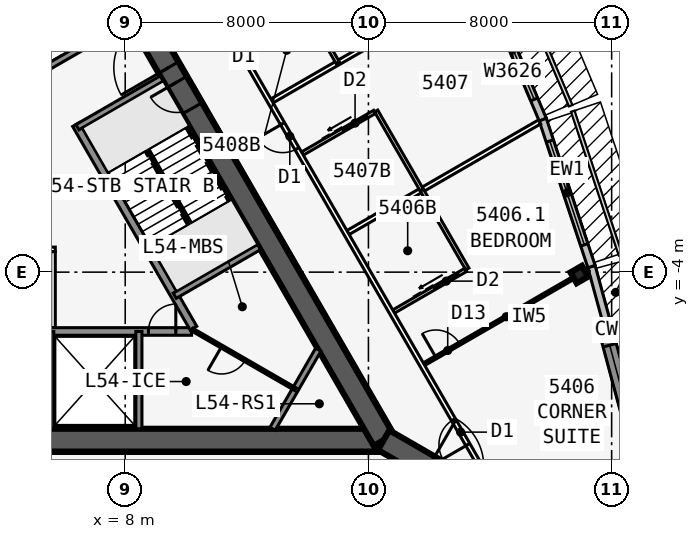
"""IFC4 building model, lengths in metres.
Left out: names, types, materials, properties, quantities, classifications, styles, units other than length and angle.
Written with IfcOpenShell. Run it as: python <this file> out.ifc"""

import sys

from ifc_helpers import new_model, si_unit, direction, frame, frame_2d, origin, origin_2d, place, context, subcontext, project, spatial, polyline, rectangle, i_section, outline, extrude, element, fill, save


model = new_model("IFC4")
c1 = context("Model", 3, precision=1e-05, world=origin(), true_north=direction((0.0, 1.0)))
c2 = subcontext(c1, "Body", "Model", "MODEL_VIEW")
j1 = project(units=[si_unit("LENGTHUNIT", "METRE"), si_unit("PLANEANGLEUNIT", "RADIAN")], contexts=[c1])
p1 = place(None, origin())
s1 = spatial("IfcSite", under=j1, at=p1, CompositionType="ELEMENT")
p2 = place(p1, origin())
s2 = spatial("IfcBuilding", under=s1, at=p2, CompositionType="ELEMENT")
p3 = place(p2, frame((0.0, 0.0, 204.5)))
s3 = spatial("IfcBuildingStorey", under=s2, at=p3, CompositionType="ELEMENT", Elevation=204.5)
p4 = place(p3, frame((-16.5, -9.526, 0.0), z_axis=(0.0, 0.0, 1.0), x_axis=(1.0, 0.0, 0.0)))
e1 = element("IfcWall", 1, at=p4, inside=s3, PredefinedType="SHEAR", context=c2, shape_type="SweptSolid", body=[
    extrude(rectangle(XDim=33.0, YDim=0.75, at=frame_2d((16.5, 0.0))), origin(), (0.0, 0.0, 1.0), 3.6),
])
p5 = place(p4, frame((14.05, 0.0, 0.0)))
e2 = element("IfcOpeningElement", 2, at=p5, cuts=e1, PredefinedType="OPENING", context=c2, shape_type="SweptSolid", body=[
    extrude(rectangle(XDim=1.8, YDim=2.13, at=frame_2d((0.9, 1.065))), frame((0.0, 0.385, 0.0), z_axis=(0.0, -1.0, 0.0), x_axis=(1.0, 0.0, 0.0)), (0.0, 0.0, 1.0), 0.77),
])
p6 = place(p3, frame((-0.55, -5.951, 0.0), z_axis=(0.0, 0.0, 1.0), x_axis=(1.0, 0.0, 0.0)))
e3 = element("IfcWall", 3, at=p6, inside=s3, PredefinedType="SOLIDWALL", context=c2, shape_type="SweptSolid", body=[
    extrude(rectangle(XDim=10.733, YDim=0.25, at=frame_2d((5.366, 0.0))), origin(), (0.0, 0.0, 1.0), 3.435),
])
p7 = place(p6, frame((9.314, 0.0, 0.0)))
e4 = element("IfcOpeningElement", 4, at=p7, cuts=e3, PredefinedType="OPENING", context=c2, shape_type="SweptSolid", body=[
    extrude(rectangle(XDim=0.9, YDim=2.13, at=frame_2d((0.45, 1.065))), frame((0.0, 0.135, 0.0), z_axis=(0.0, -1.0, 0.0), x_axis=(1.0, 0.0, 0.0)), (0.0, 0.0, 1.0), 0.27),
])
p8 = place(p6, frame((1.05, 0.0, 0.0)))
e5 = element("IfcOpeningElement", 5, at=p8, cuts=e3, PredefinedType="OPENING", context=c2, shape_type="SweptSolid", body=[
    extrude(rectangle(XDim=1.1, YDim=2.13, at=frame_2d((0.55, 1.065))), frame((0.0, 0.135, 0.0), z_axis=(0.0, -1.0, 0.0), x_axis=(1.0, 0.0, 0.0)), (0.0, 0.0, 1.0), 0.27),
])
p9 = place(p6, frame((4.05, 0.0, 0.0)))
e6 = element("IfcOpeningElement", 6, at=p9, cuts=e3, PredefinedType="OPENING", context=c2, shape_type="SweptSolid", body=[
    extrude(rectangle(XDim=1.1, YDim=2.13, at=frame_2d((0.55, 1.065))), frame((0.0, 0.135, 0.0), z_axis=(0.0, -1.0, 0.0), x_axis=(1.0, 0.0, 0.0)), (0.0, 0.0, 1.0), 0.27),
])
for number, where, z_axis, x_axis in (
    (7, (5.55, -5.951, 0.0), (0.0, 0.0, 1.0), (0.0, -1.0, 0.0)),
    (8, (8.45, -5.951, 0.0), (0.0, 0.0, 1.0), (0.0, -1.0, 0.0)),
):
    element("IfcWall", number, at=place(p3, frame(where, z_axis=z_axis, x_axis=x_axis)), inside=s3, PredefinedType="SOLIDWALL", context=c2, shape_type="SweptSolid", body=[
        extrude(rectangle(XDim=3.2, YDim=0.2, at=frame_2d((1.6, 0.0))), origin(), (0.0, 0.0, 1.0), 3.435),
    ])
p10 = place(p3, frame((16.5, -9.526, 0.0), z_axis=(0.0, 0.0, 1.0), x_axis=(-0.499999749417, 0.866025548458, 0.0)))
e9 = element("IfcWall", 9, at=p10, inside=s3, PredefinedType="SHEAR", context=c2, shape_type="SweptSolid", body=[
    extrude(rectangle(XDim=33.0, YDim=0.75, at=frame_2d((16.5, 0.0))), origin(), (0.0, 0.0, 1.0), 3.6),
])
p11 = place(p10, frame((14.15, 0.0, 0.0)))
e10 = element("IfcOpeningElement", 10, at=p11, cuts=e9, PredefinedType="OPENING", context=c2, shape_type="SweptSolid", body=[
    extrude(rectangle(XDim=1.8, YDim=2.13, at=frame_2d((0.9, 1.065))), frame((0.0, 0.385, 0.0), z_axis=(0.0, -1.0, 0.0), x_axis=(1.0, 0.0, 0.0)), (0.0, 0.0, 1.0), 0.77),
])
p12 = place(p10, frame((12.6, 0.0, 0.0)))
e11 = element("IfcOpeningElement", 11, at=p12, cuts=e9, PredefinedType="OPENING", context=c2, shape_type="SweptSolid", body=[
    extrude(rectangle(XDim=1.0, YDim=2.13, at=frame_2d((0.5, 1.065))), frame((0.0, 0.385, 0.0), z_axis=(0.0, -1.0, 0.0), x_axis=(1.0, 0.0, 0.0)), (0.0, 0.0, 1.0), 0.77),
])
p13 = place(p3, frame((10.245, -5.843, 0.0), z_axis=(0.0, 0.0, 1.0), x_axis=(-0.499993009313, 0.866029439822, 0.0)))
e12 = element("IfcWall", 12, at=p13, inside=s3, PredefinedType="SOLIDWALL", context=c2, shape_type="SweptSolid", body=[
    extrude(rectangle(XDim=7.733, YDim=0.25, at=frame_2d((3.866, 0.0))), origin(), (0.0, 0.0, 1.0), 3.435),
])
for number, where, z_axis, x_axis in (
    (13, (9.629, -4.775, 0.0), (0.0, 0.0, 1.0), (0.866, 0.5, 0.0)),
    (14, (6.429, 0.767, 0.0), (0.0, 0.0, 1.0), (0.866, 0.5, 0.0)),
):
    element("IfcWall", number, at=place(p3, frame(where, z_axis=z_axis, x_axis=x_axis)), inside=s3, PredefinedType="SOLIDWALL", context=c2, shape_type="SweptSolid", body=[
        extrude(rectangle(XDim=3.2, YDim=0.2, at=frame_2d((1.6, 0.0))), origin(), (0.0, 0.0, 1.0), 3.435),
    ])
p14 = place(p3, frame((5.329, 2.673, 0.0), z_axis=(0.0, 0.0, 1.0), x_axis=(0.866022944154, 0.50000426018, 0.0)))
e15 = element("IfcWall", 15, at=p14, inside=s3, PredefinedType="SOLIDWALL", context=c2, shape_type="SweptSolid", body=[
    extrude(rectangle(XDim=3.2, YDim=0.2, at=frame_2d((1.6, 0.0))), origin(), (0.0, 0.0, 1.0), 3.435),
])
p15 = place(p3, frame((16.5, -9.526, 0.0), z_axis=(0.0, 0.0, 1.0), x_axis=(0.866031398331, -0.499989616998, 0.0)))
e16 = element("IfcWall", 16, at=p15, inside=s3, PredefinedType="SHEAR", context=c2, shape_type="SweptSolid", body=[
    extrude(rectangle(XDim=4.746, YDim=0.75, at=frame_2d((2.373, 0.0))), origin(), (0.0, 0.0, 1.0), 3.6),
])
p16 = place(p15, frame((1.725, 0.0, 0.0)))
e17 = element("IfcOpeningElement", 17, at=p16, cuts=e16, PredefinedType="OPENING", context=c2, shape_type="SweptSolid", body=[
    extrude(rectangle(XDim=1.8, YDim=2.13, at=frame_2d((0.9, 1.065))), frame((0.0, 0.385, 0.0), z_axis=(0.0, -1.0, 0.0), x_axis=(1.0, 0.0, 0.0)), (0.0, 0.0, 1.0), 0.77),
])
p17 = place(p3, frame((22.937, -4.078, 0.0), z_axis=(0.0, 0.0, 1.0), x_axis=(-0.5, 0.866025403784, 0.0)))
e18 = element("IfcColumn", 18, at=p17, inside=s3, PredefinedType="COLUMN", context=c2, shape_type="SweptSolid", body=[
    extrude(i_section(OverallWidth=0.411, OverallDepth=0.434, WebThickness=0.036, FlangeThickness=0.057, at=origin_2d()), origin(), (0.0, 0.0, 1.0), 3.6),
])
p18 = place(p3, frame((23.783, -13.798, 0.0), z_axis=(0.0, 0.0, 1.0), x_axis=(0.258799282522, 0.96593112144, 0.0)))
e19 = element("IfcWall", 19, at=p18, inside=s3, PredefinedType="SOLIDWALL", context=c2, shape_type="SweptSolid", body=[
    extrude(outline(polyline([(4.184, 0.225), (0.509, 0.225), (0.479, 0.113), (0.059, 0.225), (0.0, 0.225), (0.0, -0.225), (4.184, -0.225), (4.184, 0.225)])), origin(), (0.0, 0.0, 1.0), 3.435),
])
p19 = place(p18, frame((1.071, 0.0, 0.45)))
e20 = element("IfcOpeningElement", 20, at=p19, cuts=e19, PredefinedType="OPENING", context=c2, shape_type="SweptSolid", body=[
    extrude(rectangle(XDim=2.4, YDim=2.6, at=frame_2d((1.2, 1.3))), frame((0.0, 0.235, 0.0), z_axis=(0.0, -1.0, 0.0), x_axis=(1.0, 0.0, 0.0)), (0.0, 0.0, 1.0), 0.47),
])
p20 = place(p3, frame((24.865, -9.873, 0.0), z_axis=(0.0, 0.0, 1.0), x_axis=(-0.258784695888, 0.965935029479, 0.0)))
e21 = element("IfcWall", 21, at=p20, inside=s3, PredefinedType="SOLIDWALL", context=c2, shape_type="SweptSolid", body=[
    extrude(rectangle(XDim=4.184, YDim=0.45, at=frame_2d((2.092, 0.0))), origin(), (0.0, 0.0, 1.0), 3.435),
])
p21 = place(p20, frame((0.592, 0.0, 0.45)))
e22 = element("IfcOpeningElement", 22, at=p21, cuts=e21, PredefinedType="OPENING", context=c2, shape_type="SweptSolid", body=[
    extrude(rectangle(XDim=3.0, YDim=2.6, at=frame_2d((1.5, 1.3))), frame((0.0, 0.235, 0.0), z_axis=(0.0, -1.0, 0.0), x_axis=(1.0, 0.0, 0.0)), (0.0, 0.0, 1.0), 0.47),
])
p22 = place(p3, frame((23.879, -5.806, 0.0), z_axis=(0.0, 0.0, 1.0), x_axis=(-0.262867703986, 0.964831887015, 0.0)))
e23 = element("IfcWall", 23, at=p22, inside=s3, PredefinedType="STANDARD", context=c2, shape_type="SweptSolid", body=[
    extrude(rectangle(XDim=2.068, YDim=0.25, at=frame_2d((1.034, 0.0))), origin(), (0.0, 0.0, 1.0), 3.435),
])
p23 = place(p3, frame((23.338, -3.817, 0.0), z_axis=(0.0, 0.0, 1.0), x_axis=(-0.315108478109, 0.949055660656, 0.0)))
e24 = element("IfcWall", 24, at=p23, inside=s3, PredefinedType="STANDARD", context=c2, shape_type="SweptSolid", body=[
    extrude(rectangle(XDim=5.105, YDim=0.25, at=frame_2d((2.552, 0.0))), origin(), (0.0, 0.0, 1.0), 3.435),
])
p24 = place(p23, frame((0.752, 0.0, 0.45)))
e25 = element("IfcOpeningElement", 25, at=p24, cuts=e24, PredefinedType="OPENING", context=c2, shape_type="SweptSolid", body=[
    extrude(rectangle(XDim=3.6, YDim=2.6, at=frame_2d((1.8, 1.3))), frame((0.0, 0.135, 0.0), z_axis=(0.0, -1.0, 0.0), x_axis=(1.0, 0.0, 0.0)), (0.0, 0.0, 1.0), 0.27),
])
p25 = place(p3, frame((21.733, 1.018, 0.0), z_axis=(0.0, 0.0, 1.0), x_axis=(-0.390096809471, 0.920773848044, 0.0)))
e26 = element("IfcWall", 26, at=p25, inside=s3, PredefinedType="STANDARD", context=c2, shape_type="SweptSolid", body=[
    extrude(rectangle(XDim=5.038, YDim=0.25, at=frame_2d((2.519, 0.0))), origin(), (0.0, 0.0, 1.0), 3.435),
])
p26 = place(p25, frame((0.719, 0.0, 0.45)))
e27 = element("IfcOpeningElement", 27, at=p26, cuts=e26, PredefinedType="OPENING", context=c2, shape_type="SweptSolid", body=[
    extrude(rectangle(XDim=3.6, YDim=2.6, at=frame_2d((1.8, 1.3))), frame((0.0, 0.135, 0.0), z_axis=(0.0, -1.0, 0.0), x_axis=(1.0, 0.0, 0.0)), (0.0, 0.0, 1.0), 0.27),
])
p27 = place(p3, frame((20.102, -11.115, 0.0), z_axis=(0.0, 0.0, 1.0), x_axis=(-0.500000265775, 0.866025250339, 0.0)))
e28 = element("IfcWall", 28, at=p27, inside=s3, PredefinedType="PARTITIONING", context=c2, shape_type="SweptSolid", body=[
    extrude(rectangle(XDim=39.354, YDim=0.15, at=frame_2d((19.677, 0.0))), origin(), (0.0, 0.0, 1.0), 3.435),
])
p28 = place(p27, frame((1.665, 0.0, 0.0)))
e29 = element("IfcOpeningElement", 29, at=p28, cuts=e28, PredefinedType="OPENING", context=c2, shape_type="SweptSolid", body=[
    extrude(rectangle(XDim=0.95, YDim=2.13, at=frame_2d((0.475, 1.065))), frame((0.0, 0.085, 0.0), z_axis=(0.0, -1.0, 0.0), x_axis=(1.0, 0.0, 0.0)), (0.0, 0.0, 1.0), 0.17),
])
p29 = place(p27, frame((12.902, 0.0, 0.0)))
e30 = element("IfcOpeningElement", 30, at=p29, cuts=e28, PredefinedType="OPENING", context=c2, shape_type="SweptSolid", body=[
    extrude(rectangle(XDim=0.95, YDim=2.13, at=frame_2d((0.475, 1.065))), frame((0.0, 0.085, 0.0), z_axis=(0.0, -1.0, 0.0), x_axis=(1.0, 0.0, 0.0)), (0.0, 0.0, 1.0), 0.17),
])
p30 = place(p27, frame((17.302, 0.0, 0.0)))
e31 = element("IfcOpeningElement", 31, at=p30, cuts=e28, PredefinedType="OPENING", context=c2, shape_type="SweptSolid", body=[
    extrude(rectangle(XDim=0.95, YDim=2.13, at=frame_2d((0.475, 1.065))), frame((0.0, 0.085, 0.0), z_axis=(0.0, -1.0, 0.0), x_axis=(1.0, 0.0, 0.0)), (0.0, 0.0, 1.0), 0.17),
])
p31 = place(p27, frame((22.902, 0.0, 0.0)))
e32 = element("IfcOpeningElement", 32, at=p31, cuts=e28, PredefinedType="OPENING", context=c2, shape_type="SweptSolid", body=[
    extrude(rectangle(XDim=0.95, YDim=2.13, at=frame_2d((0.475, 1.065))), frame((0.0, 0.085, 0.0), z_axis=(0.0, -1.0, 0.0), x_axis=(1.0, 0.0, 0.0)), (0.0, 0.0, 1.0), 0.17),
])
p32 = place(p27, frame((32.302, 0.0, 0.0)))
e33 = element("IfcOpeningElement", 33, at=p32, cuts=e28, PredefinedType="OPENING", context=c2, shape_type="SweptSolid", body=[
    extrude(rectangle(XDim=0.95, YDim=2.13, at=frame_2d((0.475, 1.065))), frame((0.0, 0.085, 0.0), z_axis=(0.0, -1.0, 0.0), x_axis=(1.0, 0.0, 0.0)), (0.0, 0.0, 1.0), 0.17),
])
p33 = place(p27, frame((37.302, 0.0, 0.0)))
e34 = element("IfcOpeningElement", 34, at=p33, cuts=e28, PredefinedType="OPENING", context=c2, shape_type="SweptSolid", body=[
    extrude(rectangle(XDim=0.95, YDim=2.13, at=frame_2d((0.475, 1.065))), frame((0.0, 0.085, 0.0), z_axis=(0.0, -1.0, 0.0), x_axis=(1.0, 0.0, 0.0)), (0.0, 0.0, 1.0), 0.17),
])
p34 = place(p3, frame((17.829, -7.027, 0.0), z_axis=(0.0, 0.0, 1.0), x_axis=(0.866026604282, 0.499997920671, 0.0)))
e35 = element("IfcWall", 35, at=p34, inside=s3, PredefinedType="PARTITIONING", context=c2, shape_type="SweptSolid", body=[
    extrude(rectangle(XDim=6.24, YDim=0.1, at=frame_2d((3.12, 0.0))), origin(), (0.0, 0.0, 1.0), 2.589),
])
p35 = place(p34, frame((0.45, 0.0, 0.0)))
e36 = element("IfcOpeningElement", 36, at=p35, cuts=e35, PredefinedType="OPENING", context=c2, shape_type="SweptSolid", body=[
    extrude(rectangle(XDim=0.9, YDim=2.13, at=frame_2d((0.45, 1.065))), frame((0.0, 0.06, 0.0), z_axis=(0.0, -1.0, 0.0), x_axis=(1.0, 0.0, 0.0)), (0.0, 0.0, 1.0), 0.12),
])
p36 = place(p3, frame((15.329, -2.697, 0.0), z_axis=(0.0, 0.0, 1.0), x_axis=(0.866032413668, 0.499987858329, 0.0)))
e37 = element("IfcWall", 37, at=p36, inside=s3, PredefinedType="PARTITIONING", context=c2, shape_type="SweptSolid", body=[
    extrude(rectangle(XDim=7.273, YDim=0.15, at=frame_2d((3.636, 0.0))), origin(), (0.0, 0.0, 1.0), 2.589),
])
p37 = place(p3, frame((12.829, 1.633, 0.0), z_axis=(0.0, 0.0, 1.0), x_axis=(0.866030558329, 0.49999107196, 0.0)))
e38 = element("IfcWall", 38, at=p37, inside=s3, PredefinedType="PARTITIONING", context=c2, shape_type="SweptSolid", body=[
    extrude(rectangle(XDim=7.894, YDim=0.15, at=frame_2d((3.947, 0.0))), origin(), (0.0, 0.0, 1.0), 2.589),
])
p38 = place(p3, frame((19.253, -3.895, 0.0), z_axis=(0.0, 0.0, 1.0), x_axis=(-0.499990139034, 0.866031096941, 0.0)))
e39 = element("IfcWall", 39, at=p38, inside=s3, PredefinedType="PLUMBINGWALL", context=c2, shape_type="SweptSolid", body=[
    extrude(rectangle(XDim=3.0, YDim=0.12, at=frame_2d((1.5, 0.0))), origin(), (0.0, 0.0, 1.0), 3.435),
])
p39 = place(p3, frame((16.829, -5.295, 0.0), z_axis=(0.0, 0.0, 1.0), x_axis=(0.866035715982, 0.499982138324, 0.0)))
e40 = element("IfcWall", 40, at=p39, inside=s3, PredefinedType="PLUMBINGWALL", context=c2, shape_type="SweptSolid", body=[
    extrude(rectangle(XDim=2.74, YDim=0.12, at=frame_2d((1.37, 0.0))), origin(), (0.0, 0.0, 1.0), 3.435),
])
p40 = place(p39, frame((1.55, 0.0, 0.0)))
e41 = element("IfcOpeningElement", 41, at=p40, cuts=e40, PredefinedType="OPENING", context=c2, shape_type="SweptSolid", body=[
    extrude(rectangle(XDim=0.9, YDim=2.13, at=frame_2d((0.45, 1.065))), frame((0.0, 0.07, 0.0), z_axis=(0.0, -1.0, 0.0), x_axis=(1.0, 0.0, 0.0)), (0.0, 0.0, 1.0), 0.14),
])
p41 = place(p3, frame((17.753, -1.297, 0.0), z_axis=(0.0, 0.0, 1.0), x_axis=(-0.499990139034, 0.866031096941, 0.0)))
e42 = element("IfcWall", 42, at=p41, inside=s3, PredefinedType="PLUMBINGWALL", context=c2, shape_type="SweptSolid", body=[
    extrude(rectangle(XDim=3.0, YDim=0.12, at=frame_2d((1.5, 0.0))), origin(), (0.0, 0.0, 1.0), 3.435),
])
p42 = place(p3, frame((13.829, -0.099, 0.0), z_axis=(0.0, 0.0, 1.0), x_axis=(0.865997131366, 0.500048966069, 0.0)))
e43 = element("IfcWall", 43, at=p42, inside=s3, PredefinedType="PLUMBINGWALL", context=c2, shape_type="SweptSolid", body=[
    extrude(rectangle(XDim=2.74, YDim=0.12, at=frame_2d((1.37, 0.0))), origin(), (0.0, 0.0, 1.0), 3.435),
])
p43 = place(p42, frame((1.55, 0.0, 0.0)))
e44 = element("IfcOpeningElement", 44, at=p43, cuts=e43, PredefinedType="OPENING", context=c2, shape_type="SweptSolid", body=[
    extrude(rectangle(XDim=0.9, YDim=2.13, at=frame_2d((0.45, 1.065))), frame((0.0, 0.07, 0.0), z_axis=(0.0, -1.0, 0.0), x_axis=(1.0, 0.0, 0.0)), (0.0, 0.0, 1.0), 0.14),
])
p44 = place(p3, frame((14.993, 2.883, 0.0), z_axis=(0.0, 0.0, 1.0), x_axis=(-0.500001309137, 0.866024647952, 0.0)))
e45 = element("IfcWall", 45, at=p44, inside=s3, PredefinedType="PLUMBINGWALL", context=c2, shape_type="SweptSolid", body=[
    extrude(rectangle(XDim=2.4, YDim=0.12, at=frame_2d((1.2, 0.0))), origin(), (0.0, 0.0, 1.0), 3.435),
])
p45 = place(p3, frame((-2.65, -3.251, 0.0), z_axis=(0.0, 0.0, 1.0), x_axis=(1.0, 0.0, 0.0)))
e46 = element("IfcWall", 46, at=p45, inside=s3, PredefinedType="PARTITIONING", context=c2, shape_type="SweptSolid", body=[
    extrude(rectangle(XDim=8.35, YDim=0.15, at=frame_2d((4.175, 0.0))), origin(), (0.0, 0.0, 1.0), 3.435),
])
p46 = place(p3, frame((5.625, -5.826, 0.0), z_axis=(0.0, 0.0, 1.0), x_axis=(0.0, 1.0, 0.0)))
e47 = element("IfcWall", 47, at=p46, inside=s3, PredefinedType="PARTITIONING", context=c2, shape_type="SweptSolid", body=[
    extrude(rectangle(XDim=2.5, YDim=0.15, at=frame_2d((1.25, 0.0))), origin(), (0.0, 0.0, 1.0), 3.435),
])
p47 = place(p3, frame((14.349, -6.551, 0.0), z_axis=(0.0, 0.0, 1.0), x_axis=(-0.499952404951, -0.866052881055, 0.0)))
e48 = element("IfcWall", 48, at=p47, inside=s3, PredefinedType="SOLIDWALL", context=c2, shape_type="SweptSolid", body=[
    extrude(rectangle(XDim=3.002, YDim=0.2, at=frame_2d((1.501, 0.0))), origin(), (0.0, 0.0, 1.0), 3.435),
])
p48 = place(p3, frame((13.599, -7.851, 0.0), z_axis=(0.0, 0.0, 1.0), x_axis=(-0.866026081073, 0.499998826899, 0.0)))
e49 = element("IfcWall", 49, at=p48, inside=s3, PredefinedType="PARTITIONING", context=c2, shape_type="SweptSolid", body=[
    extrude(rectangle(XDim=3.925, YDim=0.1, at=frame_2d((1.963, 0.0))), origin(), (0.0, 0.0, 1.0), 3.435),
])
p49 = place(p48, frame((1.905, 0.0, 0.0)))
e50 = element("IfcOpeningElement", 50, at=p49, cuts=e49, PredefinedType="OPENING", context=c2, shape_type="SweptSolid", body=[
    extrude(rectangle(XDim=0.9, YDim=2.13, at=frame_2d((0.45, 1.065))), frame((0.0, 0.06, 0.0), z_axis=(0.0, -1.0, 0.0), x_axis=(1.0, 0.0, 0.0)), (0.0, 0.0, 1.0), 0.12),
])
p50 = place(p3, frame((10.135, -2.401, 0.0), z_axis=(0.0, 0.0, 1.0), x_axis=(-0.499992232847, 0.866029888106, 0.0)))
e51 = element("IfcWall", 51, at=p50, inside=s3, PredefinedType="SOLIDWALL", context=c2, shape_type="SweptSolid", body=[
    extrude(rectangle(XDim=2.794, YDim=0.1, at=frame_2d((1.397, 0.0))), origin(), (0.0, 0.0, 1.0), 3.6),
])
p51 = place(p21, origin())
e52 = element("IfcWindow", 52, at=p51, inside=s3, PartitioningType="SINGLE_PANEL", PredefinedType="WINDOW", context=c2, shape_type="SweptSolid", body=[
    extrude(rectangle(XDim=3.0, YDim=2.6, at=frame_2d((1.5, 1.3))), frame((0.0, 0.03, 0.0), z_axis=(0.0, -1.0, 0.0), x_axis=(1.0, 0.0, 0.0)), (0.0, 0.0, 1.0), 0.06),
])
fill(e22, e52)
p52 = place(p24, origin())
e53 = element("IfcWindow", 53, at=p52, inside=s3, PartitioningType="SINGLE_PANEL", PredefinedType="WINDOW", context=c2, shape_type="SweptSolid", body=[
    extrude(rectangle(XDim=3.6, YDim=2.6, at=frame_2d((1.8, 1.3))), frame((0.0, 0.03, 0.0), z_axis=(0.0, -1.0, 0.0), x_axis=(1.0, 0.0, 0.0)), (0.0, 0.0, 1.0), 0.06),
])
fill(e25, e53)
p53 = place(p26, origin())
e54 = element("IfcWindow", 54, at=p53, inside=s3, PartitioningType="SINGLE_PANEL", PredefinedType="WINDOW", context=c2, shape_type="SweptSolid", body=[
    extrude(rectangle(XDim=3.6, YDim=2.6, at=frame_2d((1.8, 1.3))), frame((0.0, 0.03, 0.0), z_axis=(0.0, -1.0, 0.0), x_axis=(1.0, 0.0, 0.0)), (0.0, 0.0, 1.0), 0.06),
])
fill(e27, e54)
p54 = place(p35, origin())
e55 = element("IfcDoor", 55, at=p54, inside=s3, OperationType="SINGLE_SWING_LEFT", PredefinedType="DOOR", context=c2, shape_type="SweptSolid", body=[
    extrude(rectangle(XDim=0.9, YDim=2.13, at=frame_2d((0.45, 1.065))), frame((0.0, 0.025, 0.0), z_axis=(0.0, -1.0, 0.0), x_axis=(1.0, 0.0, 0.0)), (0.0, 0.0, 1.0), 0.05),
])
fill(e36, e55)
p55 = place(p28, origin())
e56 = element("IfcDoor", 56, at=p55, inside=s3, OperationType="SINGLE_SWING_LEFT", PredefinedType="DOOR", context=c2, shape_type="SweptSolid", body=[
    extrude(rectangle(XDim=0.95, YDim=2.13, at=frame_2d((0.475, 1.065))), frame((0.0, 0.025, 0.0), z_axis=(0.0, -1.0, 0.0), x_axis=(1.0, 0.0, 0.0)), (0.0, 0.0, 1.0), 0.05),
])
fill(e29, e56)
p56 = place(p40, origin())
e57 = element("IfcDoor", 57, at=p56, inside=s3, OperationType="SLIDING_TO_LEFT", PredefinedType="DOOR", context=c2, shape_type="SweptSolid", body=[
    extrude(rectangle(XDim=0.9, YDim=2.13, at=frame_2d((0.45, 1.065))), frame((0.0, 0.025, 0.0), z_axis=(0.0, -1.0, 0.0), x_axis=(1.0, 0.0, 0.0)), (0.0, 0.0, 1.0), 0.05),
])
fill(e41, e57)
p57 = place(p43, origin())
e58 = element("IfcDoor", 58, at=p57, inside=s3, OperationType="SLIDING_TO_LEFT", PredefinedType="DOOR", context=c2, shape_type="SweptSolid", body=[
    extrude(rectangle(XDim=0.9, YDim=2.13, at=frame_2d((0.45, 1.065))), frame((0.0, 0.025, 0.0), z_axis=(0.0, -1.0, 0.0), x_axis=(1.0, 0.0, 0.0)), (0.0, 0.0, 1.0), 0.05),
])
fill(e44, e58)
p58 = place(p29, origin())
e59 = element("IfcDoor", 59, at=p58, inside=s3, OperationType="SINGLE_SWING_RIGHT", PredefinedType="DOOR", context=c2, shape_type="SweptSolid", body=[
    extrude(rectangle(XDim=0.95, YDim=2.13, at=frame_2d((0.475, 1.065))), frame((0.0, 0.025, 0.0), z_axis=(0.0, -1.0, 0.0), x_axis=(1.0, 0.0, 0.0)), (0.0, 0.0, 1.0), 0.05),
])
fill(e30, e59)
p59 = place(p11, origin())
e60 = element("IfcDoor", 60, at=p59, inside=s3, OperationType="DOUBLE_DOOR_SINGLE_SWING", PredefinedType="DOOR", context=c2, shape_type="SweptSolid", body=[
    extrude(rectangle(XDim=1.8, YDim=2.13, at=frame_2d((0.9, 1.065))), frame((0.0, 0.025, 0.0), z_axis=(0.0, -1.0, 0.0), x_axis=(1.0, 0.0, 0.0)), (0.0, 0.0, 1.0), 0.05),
])
fill(e10, e60)
p60 = place(p12, origin())
e61 = element("IfcDoor", 61, at=p60, inside=s3, OperationType="SINGLE_SWING_RIGHT", PredefinedType="DOOR", context=c2, shape_type="SweptSolid", body=[
    extrude(rectangle(XDim=1.0, YDim=2.13, at=frame_2d((0.5, 1.065))), frame((0.0, 0.025, 0.0), z_axis=(0.0, -1.0, 0.0), x_axis=(1.0, 0.0, 0.0)), (0.0, 0.0, 1.0), 0.05),
])
fill(e11, e61)
p61 = place(p7, origin())
e62 = element("IfcDoor", 62, at=p61, inside=s3, OperationType="SINGLE_SWING_RIGHT", PredefinedType="DOOR", context=c2, shape_type="SweptSolid", body=[
    extrude(rectangle(XDim=0.9, YDim=2.13, at=frame_2d((0.45, 1.065))), frame((0.0, 0.025, 0.0), z_axis=(0.0, -1.0, 0.0), x_axis=(1.0, 0.0, 0.0)), (0.0, 0.0, 1.0), 0.05),
])
fill(e4, e62)
p62 = place(p49, origin())
e63 = element("IfcDoor", 63, at=p62, inside=s3, OperationType="SINGLE_SWING_RIGHT", PredefinedType="DOOR", context=c2, shape_type="SweptSolid", body=[
    extrude(rectangle(XDim=0.9, YDim=2.13, at=frame_2d((0.45, 1.065))), frame((0.0, 0.025, 0.0), z_axis=(0.0, -1.0, 0.0), x_axis=(1.0, 0.0, 0.0)), (0.0, 0.0, 1.0), 0.05),
])
fill(e50, e63)
save(model, sys.argv[1])
